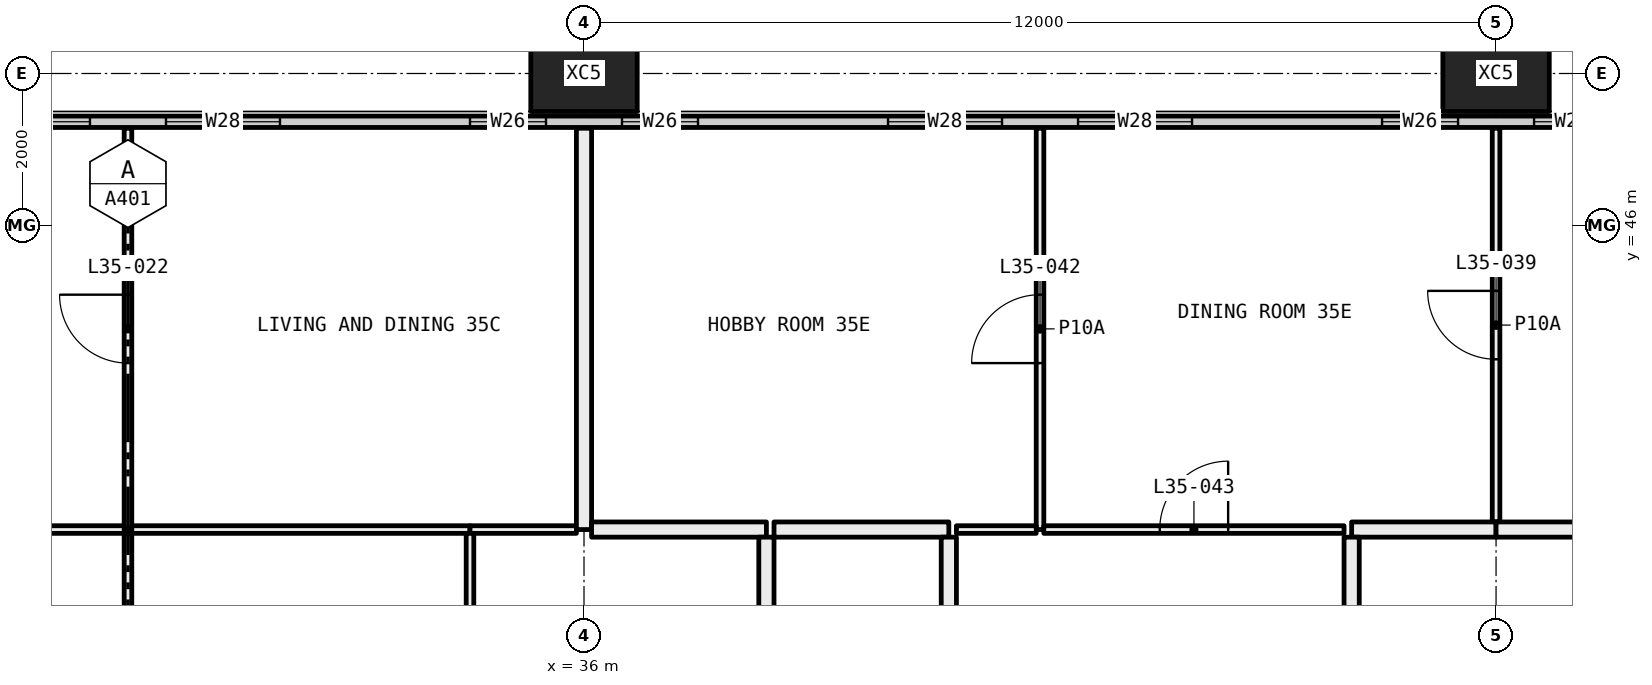
"""IFC4 building model, lengths in metres.
Left out: names, types, materials, properties, quantities, classifications, styles, units other than length and angle.
Written with IfcOpenShell. Run it as: python <this file> out.ifc"""

import sys

from ifc_helpers import new_model, si_unit, direction, frame, frame_2d, origin, origin_2d, place, context, subcontext, project, spatial, rectangle, hollow_rectangle, extrude, element, fill, save


model = new_model("IFC4")
c1 = context("Model", 3, precision=1e-05, world=origin(), true_north=direction((0.0, 1.0)))
c2 = subcontext(c1, "Body", "Model", "MODEL_VIEW")
j1 = project(units=[si_unit("LENGTHUNIT", "METRE"), si_unit("PLANEANGLEUNIT", "RADIAN")], contexts=[c1])
p1 = place(None, origin())
s1 = spatial("IfcSite", under=j1, at=p1, CompositionType="ELEMENT")
p2 = place(p1, origin())
s2 = spatial("IfcBuilding", under=s1, at=p2, CompositionType="ELEMENT")
p3 = place(p2, frame((0.0, 0.0, 134.55)))
s3 = spatial("IfcBuildingStorey", under=s2, at=p3, CompositionType="ELEMENT", Elevation=134.55)
for number, where, z_axis, x_axis in (
    (1, (36.0, 48.0, -0.4), (0.0, 0.0, 1.0), (1.0, 0.0, 0.0)),
    (2, (48.0, 48.0, -0.4), (0.0, 0.0, 1.0), (1.0, 0.0, 0.0)),
):
    element("IfcColumn", number, at=place(p3, frame(where, z_axis=z_axis, x_axis=x_axis)), inside=s3, PredefinedType="COLUMN", context=c2, shape_type="SweptSolid", body=[
        extrude(hollow_rectangle(XDim=1.4, YDim=1.0, WallThickness=0.055, at=origin_2d()), origin(), (0.0, 0.0, 1.0), 3.45),
    ])
p4 = place(p3, frame((6.56, 47.365, 0.0), z_axis=(0.0, 0.0, 1.0), x_axis=(1.0, 0.0, 0.0)))
e3 = element("IfcWall", 3, at=p4, inside=s3, PredefinedType="ELEMENTEDWALL", context=c2, shape_type="SweptSolid", body=[
    extrude(rectangle(XDim=58.88, YDim=0.15, at=frame_2d((29.44, 0.0))), origin(), (0.0, 0.0, 1.0), 3.05),
])
p5 = place(p4, frame((0.44, 0.0, 0.45)))
e4 = element("IfcOpeningElement", 4, at=p5, cuts=e3, PredefinedType="OPENING", context=c2, shape_type="SweptSolid", body=[
    extrude(rectangle(XDim=4.5, YDim=2.55, at=frame_2d((2.25, 1.275))), frame((0.0, 0.085, 0.0), z_axis=(0.0, -1.0, 0.0), x_axis=(1.0, 0.0, 0.0)), (0.0, 0.0, 1.0), 0.17),
])
p6 = place(p4, frame((5.94, 0.0, 0.45)))
e5 = element("IfcOpeningElement", 5, at=p6, cuts=e3, PredefinedType="OPENING", context=c2, shape_type="SweptSolid", body=[
    extrude(rectangle(XDim=1.0, YDim=2.55, at=frame_2d((0.5, 1.275))), frame((0.0, 0.085, 0.0), z_axis=(0.0, -1.0, 0.0), x_axis=(1.0, 0.0, 0.0)), (0.0, 0.0, 1.0), 0.17),
])
p7 = place(p4, frame((9.44, 0.0, 0.45)))
e6 = element("IfcOpeningElement", 6, at=p7, cuts=e3, PredefinedType="OPENING", context=c2, shape_type="SweptSolid", body=[
    extrude(rectangle(XDim=1.5, YDim=2.55, at=frame_2d((0.75, 1.275))), frame((0.0, 0.085, 0.0), z_axis=(0.0, -1.0, 0.0), x_axis=(1.0, 0.0, 0.0)), (0.0, 0.0, 1.0), 0.17),
])
p8 = place(p4, frame((11.94, 0.0, 0.45)))
e7 = element("IfcOpeningElement", 7, at=p8, cuts=e3, PredefinedType="OPENING", context=c2, shape_type="SweptSolid", body=[
    extrude(rectangle(XDim=1.5, YDim=2.55, at=frame_2d((0.75, 1.275))), frame((0.0, 0.085, 0.0), z_axis=(0.0, -1.0, 0.0), x_axis=(1.0, 0.0, 0.0)), (0.0, 0.0, 1.0), 0.17),
])
p9 = place(p4, frame((15.94, 0.0, 0.45)))
e8 = element("IfcOpeningElement", 8, at=p9, cuts=e3, PredefinedType="OPENING", context=c2, shape_type="SweptSolid", body=[
    extrude(rectangle(XDim=1.0, YDim=2.55, at=frame_2d((0.5, 1.275))), frame((0.0, 0.085, 0.0), z_axis=(0.0, -1.0, 0.0), x_axis=(1.0, 0.0, 0.0)), (0.0, 0.0, 1.0), 0.17),
])
p10 = place(p4, frame((17.94, 0.0, 0.45)))
e9 = element("IfcOpeningElement", 9, at=p10, cuts=e3, PredefinedType="OPENING", context=c2, shape_type="SweptSolid", body=[
    extrude(rectangle(XDim=1.0, YDim=2.55, at=frame_2d((0.5, 1.275))), frame((0.0, 0.085, 0.0), z_axis=(0.0, -1.0, 0.0), x_axis=(1.0, 0.0, 0.0)), (0.0, 0.0, 1.0), 0.17),
])
p11 = place(p4, frame((21.44, 0.0, 0.45)))
e10 = element("IfcOpeningElement", 10, at=p11, cuts=e3, PredefinedType="OPENING", context=c2, shape_type="SweptSolid", body=[
    extrude(rectangle(XDim=1.5, YDim=2.55, at=frame_2d((0.75, 1.275))), frame((0.0, 0.085, 0.0), z_axis=(0.0, -1.0, 0.0), x_axis=(1.0, 0.0, 0.0)), (0.0, 0.0, 1.0), 0.17),
])
p12 = place(p4, frame((23.94, 0.0, 0.45)))
e11 = element("IfcOpeningElement", 11, at=p12, cuts=e3, PredefinedType="OPENING", context=c2, shape_type="SweptSolid", body=[
    extrude(rectangle(XDim=1.5, YDim=2.55, at=frame_2d((0.75, 1.275))), frame((0.0, 0.085, 0.0), z_axis=(0.0, -1.0, 0.0), x_axis=(1.0, 0.0, 0.0)), (0.0, 0.0, 1.0), 0.17),
])
p13 = place(p4, frame((27.94, 0.0, 0.45)))
e12 = element("IfcOpeningElement", 12, at=p13, cuts=e3, PredefinedType="OPENING", context=c2, shape_type="SweptSolid", body=[
    extrude(rectangle(XDim=1.0, YDim=2.55, at=frame_2d((0.5, 1.275))), frame((0.0, 0.085, 0.0), z_axis=(0.0, -1.0, 0.0), x_axis=(1.0, 0.0, 0.0)), (0.0, 0.0, 1.0), 0.17),
])
p14 = place(p4, frame((29.94, 0.0, 0.45)))
e13 = element("IfcOpeningElement", 13, at=p14, cuts=e3, PredefinedType="OPENING", context=c2, shape_type="SweptSolid", body=[
    extrude(rectangle(XDim=1.0, YDim=2.55, at=frame_2d((0.5, 1.275))), frame((0.0, 0.085, 0.0), z_axis=(0.0, -1.0, 0.0), x_axis=(1.0, 0.0, 0.0)), (0.0, 0.0, 1.0), 0.17),
])
p15 = place(p4, frame((33.44, 0.0, 0.45)))
e14 = element("IfcOpeningElement", 14, at=p15, cuts=e3, PredefinedType="OPENING", context=c2, shape_type="SweptSolid", body=[
    extrude(rectangle(XDim=1.5, YDim=2.55, at=frame_2d((0.75, 1.275))), frame((0.0, 0.085, 0.0), z_axis=(0.0, -1.0, 0.0), x_axis=(1.0, 0.0, 0.0)), (0.0, 0.0, 1.0), 0.17),
])
p16 = place(p4, frame((35.94, 0.0, 0.45)))
e15 = element("IfcOpeningElement", 15, at=p16, cuts=e3, PredefinedType="OPENING", context=c2, shape_type="SweptSolid", body=[
    extrude(rectangle(XDim=1.5, YDim=2.55, at=frame_2d((0.75, 1.275))), frame((0.0, 0.085, 0.0), z_axis=(0.0, -1.0, 0.0), x_axis=(1.0, 0.0, 0.0)), (0.0, 0.0, 1.0), 0.17),
])
p17 = place(p4, frame((39.94, 0.0, 0.45)))
e16 = element("IfcOpeningElement", 16, at=p17, cuts=e3, PredefinedType="OPENING", context=c2, shape_type="SweptSolid", body=[
    extrude(rectangle(XDim=1.0, YDim=2.55, at=frame_2d((0.5, 1.275))), frame((0.0, 0.085, 0.0), z_axis=(0.0, -1.0, 0.0), x_axis=(1.0, 0.0, 0.0)), (0.0, 0.0, 1.0), 0.17),
])
p18 = place(p4, frame((41.94, 0.0, 0.45)))
e17 = element("IfcOpeningElement", 17, at=p18, cuts=e3, PredefinedType="OPENING", context=c2, shape_type="SweptSolid", body=[
    extrude(rectangle(XDim=1.0, YDim=2.55, at=frame_2d((0.5, 1.275))), frame((0.0, 0.085, 0.0), z_axis=(0.0, -1.0, 0.0), x_axis=(1.0, 0.0, 0.0)), (0.0, 0.0, 1.0), 0.17),
])
p19 = place(p4, frame((45.44, 0.0, 0.45)))
e18 = element("IfcOpeningElement", 18, at=p19, cuts=e3, PredefinedType="OPENING", context=c2, shape_type="SweptSolid", body=[
    extrude(rectangle(XDim=1.5, YDim=2.55, at=frame_2d((0.75, 1.275))), frame((0.0, 0.085, 0.0), z_axis=(0.0, -1.0, 0.0), x_axis=(1.0, 0.0, 0.0)), (0.0, 0.0, 1.0), 0.17),
])
p20 = place(p4, frame((47.94, 0.0, 0.45)))
e19 = element("IfcOpeningElement", 19, at=p20, cuts=e3, PredefinedType="OPENING", context=c2, shape_type="SweptSolid", body=[
    extrude(rectangle(XDim=1.5, YDim=2.55, at=frame_2d((0.75, 1.275))), frame((0.0, 0.085, 0.0), z_axis=(0.0, -1.0, 0.0), x_axis=(1.0, 0.0, 0.0)), (0.0, 0.0, 1.0), 0.17),
])
p21 = place(p4, frame((51.94, 0.0, 0.45)))
e20 = element("IfcOpeningElement", 20, at=p21, cuts=e3, PredefinedType="OPENING", context=c2, shape_type="SweptSolid", body=[
    extrude(rectangle(XDim=1.0, YDim=2.55, at=frame_2d((0.5, 1.275))), frame((0.0, 0.085, 0.0), z_axis=(0.0, -1.0, 0.0), x_axis=(1.0, 0.0, 0.0)), (0.0, 0.0, 1.0), 0.17),
])
p22 = place(p4, frame((53.94, 0.0, 0.45)))
e21 = element("IfcOpeningElement", 21, at=p22, cuts=e3, PredefinedType="OPENING", context=c2, shape_type="SweptSolid", body=[
    extrude(rectangle(XDim=4.5, YDim=2.55, at=frame_2d((2.25, 1.275))), frame((0.0, 0.085, 0.0), z_axis=(0.0, -1.0, 0.0), x_axis=(1.0, 0.0, 0.0)), (0.0, 0.0, 1.0), 0.17),
])
p23 = place(p3, frame((30.0, 42.0, 0.0), z_axis=(0.0, 0.0, 1.0), x_axis=(0.0, 1.0, 0.0)))
e22 = element("IfcWall", 22, at=p23, inside=s3, PredefinedType="PARTITIONING", context=c2, shape_type="SweptSolid", body=[
    extrude(rectangle(XDim=5.28, YDim=0.1, at=frame_2d((2.64, 0.0))), origin(), (0.0, 0.0, 1.0), 3.05),
])
p24 = place(p23, frame((2.19, 0.0, 0.0)))
e23 = element("IfcOpeningElement", 23, at=p24, cuts=e22, PredefinedType="OPENING", context=c2, shape_type="SweptSolid", body=[
    extrude(rectangle(XDim=0.9, YDim=2.1, at=frame_2d((0.45, 1.05))), frame((0.0, 0.06, 0.0), z_axis=(0.0, -1.0, 0.0), x_axis=(1.0, 0.0, 0.0)), (0.0, 0.0, 1.0), 0.12),
])
p25 = place(p3, frame((26.0, 42.0, 0.0), z_axis=(0.0, 0.0, 1.0), x_axis=(1.0, 0.0, 0.0)))
e24 = element("IfcWall", 24, at=p25, inside=s3, PredefinedType="PARTITIONING", context=c2, shape_type="SweptSolid", body=[
    extrude(rectangle(XDim=3.95, YDim=0.1, at=frame_2d((1.975, 0.0))), origin(), (0.0, 0.0, 1.0), 3.05),
])
p26 = place(p25, frame((1.525, 0.0, 0.0)))
e25 = element("IfcOpeningElement", 25, at=p26, cuts=e24, PredefinedType="OPENING", context=c2, shape_type="SweptSolid", body=[
    extrude(rectangle(XDim=0.9, YDim=2.1, at=frame_2d((0.45, 1.05))), frame((0.0, 0.06, 0.0), z_axis=(0.0, -1.0, 0.0), x_axis=(1.0, 0.0, 0.0)), (0.0, 0.0, 1.0), 0.12),
])
p27 = place(p3, frame((30.05, 42.0, 0.0), z_axis=(0.0, 0.0, 1.0), x_axis=(1.0, 0.0, 0.0)))
e26 = element("IfcWall", 26, at=p27, inside=s3, PredefinedType="PARTITIONING", context=c2, shape_type="SweptSolid", body=[
    extrude(rectangle(XDim=4.45, YDim=0.1, at=frame_2d((2.225, 0.0))), origin(), (0.0, 0.0, 1.0), 3.05),
])
p28 = place(p3, frame((34.5, 42.0, 0.0), z_axis=(0.0, 0.0, 1.0), x_axis=(1.0, 0.0, 0.0)))
e27 = element("IfcWall", 27, at=p28, inside=s3, PredefinedType="PARTITIONING", context=c2, shape_type="SweptSolid", body=[
    extrude(rectangle(XDim=1.4, YDim=0.1, at=frame_2d((0.7, 0.0))), origin(), (0.0, 0.0, 1.0), 3.05),
])
p29 = place(p3, frame((36.0, 42.0, 0.0), z_axis=(0.0, 0.0, 1.0), x_axis=(0.0, 1.0, 0.0)))
e28 = element("IfcWall", 28, at=p29, inside=s3, PredefinedType="PARTITIONING", context=c2, shape_type="SweptSolid", body=[
    extrude(rectangle(XDim=5.28, YDim=0.2, at=frame_2d((2.64, 0.0))), origin(), (0.0, 0.0, 1.0), 2.45),
])
p30 = place(p3, frame((30.0, 36.1, 0.0), z_axis=(0.0, 0.0, 1.0), x_axis=(0.0, 1.0, 0.0)))
e29 = element("IfcWall", 29, at=p30, inside=s3, PredefinedType="PARTITIONING", context=c2, shape_type="SweptSolid", body=[
    extrude(rectangle(XDim=5.85, YDim=0.1, at=frame_2d((2.925, 0.0))), origin(), (0.0, 0.0, 1.0), 3.05),
])
p31 = place(p30, frame((2.475, 0.0, 0.0)))
e30 = element("IfcOpeningElement", 30, at=p31, cuts=e29, PredefinedType="OPENING", context=c2, shape_type="SweptSolid", body=[
    extrude(rectangle(XDim=0.9, YDim=2.1, at=frame_2d((0.45, 1.05))), frame((0.0, 0.06, 0.0), z_axis=(0.0, -1.0, 0.0), x_axis=(1.0, 0.0, 0.0)), (0.0, 0.0, 1.0), 0.12),
])
p32 = place(p3, frame((34.5, 36.1, 0.0), z_axis=(0.0, 0.0, 1.0), x_axis=(0.0, 1.0, 0.0)))
e31 = element("IfcWall", 31, at=p32, inside=s3, PredefinedType="PARTITIONING", context=c2, shape_type="SweptSolid", body=[
    extrude(rectangle(XDim=5.85, YDim=0.1, at=frame_2d((2.925, 0.0))), origin(), (0.0, 0.0, 1.0), 3.05),
])
p33 = place(p32, frame((2.475, 0.0, 0.0)))
e32 = element("IfcOpeningElement", 32, at=p33, cuts=e31, PredefinedType="OPENING", context=c2, shape_type="SweptSolid", body=[
    extrude(rectangle(XDim=0.9, YDim=2.1, at=frame_2d((0.45, 1.05))), frame((0.0, 0.06, 0.0), z_axis=(0.0, -1.0, 0.0), x_axis=(1.0, 0.0, 0.0)), (0.0, 0.0, 1.0), 0.12),
])
p34 = place(p3, frame((38.4, 42.0, 0.0), z_axis=(0.0, 0.0, 1.0), x_axis=(-1.0, 0.0, 0.0)))
e33 = element("IfcWall", 33, at=p34, inside=s3, PredefinedType="PARTITIONING", context=c2, shape_type="SweptSolid", body=[
    extrude(rectangle(XDim=2.3, YDim=0.2, at=frame_2d((1.15, 0.0))), origin(), (0.0, 0.0, 1.0), 3.05),
])
p35 = place(p3, frame((38.4, 36.1, 0.0), z_axis=(0.0, 0.0, 1.0), x_axis=(0.0, 1.0, 0.0)))
e34 = element("IfcWall", 34, at=p35, inside=s3, PredefinedType="PARTITIONING", context=c2, shape_type="SweptSolid", body=[
    extrude(rectangle(XDim=5.8, YDim=0.2, at=frame_2d((2.9, 0.0))), origin(), (0.0, 0.0, 1.0), 3.05),
])
p36 = place(p3, frame((42.0, 42.0, 0.0), z_axis=(0.0, 0.0, 1.0), x_axis=(0.0, 1.0, 0.0)))
e35 = element("IfcWall", 35, at=p36, inside=s3, PredefinedType="PARTITIONING", context=c2, shape_type="SweptSolid", body=[
    extrude(rectangle(XDim=5.28, YDim=0.1, at=frame_2d((2.64, 0.0))), origin(), (0.0, 0.0, 1.0), 3.05),
])
p37 = place(p36, frame((2.19, 0.0, 0.0)))
e36 = element("IfcOpeningElement", 36, at=p37, cuts=e35, PredefinedType="OPENING", context=c2, shape_type="SweptSolid", body=[
    extrude(rectangle(XDim=0.9, YDim=2.1, at=frame_2d((0.45, 1.05))), frame((0.0, 0.06, 0.0), z_axis=(0.0, -1.0, 0.0), x_axis=(1.0, 0.0, 0.0)), (0.0, 0.0, 1.0), 0.12),
])
p38 = place(p3, frame((40.9, 42.0, 0.0), z_axis=(0.0, 0.0, 1.0), x_axis=(1.0, 0.0, 0.0)))
e37 = element("IfcWall", 37, at=p38, inside=s3, PredefinedType="PARTITIONING", context=c2, shape_type="SweptSolid", body=[
    extrude(rectangle(XDim=1.05, YDim=0.1, at=frame_2d((0.525, 0.0))), origin(), (0.0, 0.0, 1.0), 3.05),
])
p39 = place(p3, frame((38.5, 42.0, 0.0), z_axis=(0.0, 0.0, 1.0), x_axis=(1.0, 0.0, 0.0)))
e38 = element("IfcWall", 38, at=p39, inside=s3, PredefinedType="PARTITIONING", context=c2, shape_type="SweptSolid", body=[
    extrude(rectangle(XDim=2.3, YDim=0.2, at=frame_2d((1.15, 0.0))), origin(), (0.0, 0.0, 1.0), 3.05),
])
p40 = place(p3, frame((48.0, 42.1, 0.0), z_axis=(0.0, 0.0, 1.0), x_axis=(0.0, 1.0, 0.0)))
e39 = element("IfcWall", 39, at=p40, inside=s3, PredefinedType="PARTITIONING", context=c2, shape_type="SweptSolid", body=[
    extrude(rectangle(XDim=5.18, YDim=0.1, at=frame_2d((2.59, 0.0))), origin(), (0.0, 0.0, 1.0), 3.05),
])
p41 = place(p40, frame((2.14, 0.0, 0.0)))
e40 = element("IfcOpeningElement", 40, at=p41, cuts=e39, PredefinedType="OPENING", context=c2, shape_type="SweptSolid", body=[
    extrude(rectangle(XDim=0.9, YDim=2.1, at=frame_2d((0.45, 1.05))), frame((0.0, 0.06, 0.0), z_axis=(0.0, -1.0, 0.0), x_axis=(1.0, 0.0, 0.0)), (0.0, 0.0, 1.0), 0.12),
])
p42 = place(p3, frame((42.05, 42.0, 0.0), z_axis=(0.0, 0.0, 1.0), x_axis=(1.0, 0.0, 0.0)))
e41 = element("IfcWall", 41, at=p42, inside=s3, PredefinedType="PARTITIONING", context=c2, shape_type="SweptSolid", body=[
    extrude(rectangle(XDim=3.95, YDim=0.1, at=frame_2d((1.975, 0.0))), origin(), (0.0, 0.0, 1.0), 3.05),
])
p43 = place(p42, frame((1.525, 0.0, 0.0)))
e42 = element("IfcOpeningElement", 42, at=p43, cuts=e41, PredefinedType="OPENING", context=c2, shape_type="SweptSolid", body=[
    extrude(rectangle(XDim=0.9, YDim=2.1, at=frame_2d((0.45, 1.05))), frame((0.0, 0.06, 0.0), z_axis=(0.0, -1.0, 0.0), x_axis=(1.0, 0.0, 0.0)), (0.0, 0.0, 1.0), 0.12),
])
p44 = place(p3, frame((46.1, 42.0, 0.0), z_axis=(0.0, 0.0, 1.0), x_axis=(1.0, 0.0, 0.0)))
e43 = element("IfcWall", 43, at=p44, inside=s3, PredefinedType="PARTITIONING", context=c2, shape_type="SweptSolid", body=[
    extrude(rectangle(XDim=1.9, YDim=0.2, at=frame_2d((0.95, 0.0))), origin(), (0.0, 0.0, 1.0), 3.05),
])
p45 = place(p3, frame((48.0, 42.0, 0.0), z_axis=(0.0, 0.0, 1.0), x_axis=(1.0, 0.0, 0.0)))
e44 = element("IfcWall", 44, at=p45, inside=s3, PredefinedType="PARTITIONING", context=c2, shape_type="SweptSolid", body=[
    extrude(rectangle(XDim=6.0, YDim=0.2, at=frame_2d((3.0, 0.0))), origin(), (0.0, 0.0, 1.0), 3.05),
])
p46 = place(p45, frame((2.5, 0.0, 0.0)))
e45 = element("IfcOpeningElement", 45, at=p46, cuts=e44, PredefinedType="OPENING", context=c2, shape_type="SweptSolid", body=[
    extrude(rectangle(XDim=1.0, YDim=2.1, at=frame_2d((0.5, 1.05))), frame((0.0, 0.11, 0.0), z_axis=(0.0, -1.0, 0.0), x_axis=(1.0, 0.0, 0.0)), (0.0, 0.0, 1.0), 0.22),
])
p47 = place(p3, frame((40.8, 41.9, 0.0), z_axis=(0.0, 0.0, 1.0), x_axis=(0.0, -1.0, 0.0)))
e46 = element("IfcWall", 46, at=p47, inside=s3, PredefinedType="PARTITIONING", context=c2, shape_type="SweptSolid", body=[
    extrude(rectangle(XDim=6.2, YDim=0.2, at=frame_2d((3.1, 0.0))), origin(), (0.0, 0.0, 1.0), 2.45),
])
p48 = place(p3, frame((46.1, 36.1, 0.0), z_axis=(0.0, 0.0, 1.0), x_axis=(0.0, 1.0, 0.0)))
e47 = element("IfcWall", 47, at=p48, inside=s3, PredefinedType="PARTITIONING", context=c2, shape_type="SweptSolid", body=[
    extrude(rectangle(XDim=5.8, YDim=0.2, at=frame_2d((2.9, 0.0))), origin(), (0.0, 0.0, 1.0), 3.05),
])
p49 = place(p11, origin())
e48 = element("IfcWindow", 48, at=p49, inside=s3, PartitioningType="SINGLE_PANEL", PredefinedType="WINDOW", context=c2, shape_type="SweptSolid", body=[
    extrude(rectangle(XDim=1.5, YDim=2.55, at=frame_2d((0.75, 1.275))), frame((0.0, 0.03, 0.0), z_axis=(0.0, -1.0, 0.0), x_axis=(1.0, 0.0, 0.0)), (0.0, 0.0, 1.0), 0.06),
])
fill(e10, e48)
p50 = place(p12, origin())
e49 = element("IfcWindow", 49, at=p50, inside=s3, PartitioningType="SINGLE_PANEL", PredefinedType="WINDOW", context=c2, shape_type="SweptSolid", body=[
    extrude(rectangle(XDim=1.5, YDim=2.55, at=frame_2d((0.75, 1.275))), frame((0.0, 0.03, 0.0), z_axis=(0.0, -1.0, 0.0), x_axis=(1.0, 0.0, 0.0)), (0.0, 0.0, 1.0), 0.06),
])
fill(e11, e49)
p51 = place(p13, origin())
e50 = element("IfcWindow", 50, at=p51, inside=s3, PartitioningType="SINGLE_PANEL", PredefinedType="WINDOW", context=c2, shape_type="SweptSolid", body=[
    extrude(rectangle(XDim=1.0, YDim=2.55, at=frame_2d((0.5, 1.275))), frame((0.0, 0.03, 0.0), z_axis=(0.0, -1.0, 0.0), x_axis=(1.0, 0.0, 0.0)), (0.0, 0.0, 1.0), 0.06),
])
fill(e12, e50)
p52 = place(p14, origin())
e51 = element("IfcWindow", 51, at=p52, inside=s3, PartitioningType="SINGLE_PANEL", PredefinedType="WINDOW", context=c2, shape_type="SweptSolid", body=[
    extrude(rectangle(XDim=1.0, YDim=2.55, at=frame_2d((0.5, 1.275))), frame((0.0, 0.03, 0.0), z_axis=(0.0, -1.0, 0.0), x_axis=(1.0, 0.0, 0.0)), (0.0, 0.0, 1.0), 0.06),
])
fill(e13, e51)
p53 = place(p15, origin())
e52 = element("IfcWindow", 52, at=p53, inside=s3, PartitioningType="SINGLE_PANEL", PredefinedType="WINDOW", context=c2, shape_type="SweptSolid", body=[
    extrude(rectangle(XDim=1.5, YDim=2.55, at=frame_2d((0.75, 1.275))), frame((0.0, 0.03, 0.0), z_axis=(0.0, -1.0, 0.0), x_axis=(1.0, 0.0, 0.0)), (0.0, 0.0, 1.0), 0.06),
])
fill(e14, e52)
p54 = place(p16, origin())
e53 = element("IfcWindow", 53, at=p54, inside=s3, PartitioningType="SINGLE_PANEL", PredefinedType="WINDOW", context=c2, shape_type="SweptSolid", body=[
    extrude(rectangle(XDim=1.5, YDim=2.55, at=frame_2d((0.75, 1.275))), frame((0.0, 0.03, 0.0), z_axis=(0.0, -1.0, 0.0), x_axis=(1.0, 0.0, 0.0)), (0.0, 0.0, 1.0), 0.06),
])
fill(e15, e53)
p55 = place(p17, origin())
e54 = element("IfcWindow", 54, at=p55, inside=s3, PartitioningType="SINGLE_PANEL", PredefinedType="WINDOW", context=c2, shape_type="SweptSolid", body=[
    extrude(rectangle(XDim=1.0, YDim=2.55, at=frame_2d((0.5, 1.275))), frame((0.0, 0.03, 0.0), z_axis=(0.0, -1.0, 0.0), x_axis=(1.0, 0.0, 0.0)), (0.0, 0.0, 1.0), 0.06),
])
fill(e16, e54)
p56 = place(p18, origin())
e55 = element("IfcWindow", 55, at=p56, inside=s3, PartitioningType="SINGLE_PANEL", PredefinedType="WINDOW", context=c2, shape_type="SweptSolid", body=[
    extrude(rectangle(XDim=1.0, YDim=2.55, at=frame_2d((0.5, 1.275))), frame((0.0, 0.03, 0.0), z_axis=(0.0, -1.0, 0.0), x_axis=(1.0, 0.0, 0.0)), (0.0, 0.0, 1.0), 0.06),
])
fill(e17, e55)
p57 = place(p24, origin())
e56 = element("IfcDoor", 56, at=p57, inside=s3, OperationType="SINGLE_SWING_LEFT", PredefinedType="DOOR", context=c2, shape_type="SweptSolid", body=[
    extrude(rectangle(XDim=0.9, YDim=2.1, at=frame_2d((0.45, 1.05))), frame((0.0, 0.025, 0.0), z_axis=(0.0, -1.0, 0.0), x_axis=(1.0, 0.0, 0.0)), (0.0, 0.0, 1.0), 0.05),
])
fill(e23, e56)
p58 = place(p41, origin())
e57 = element("IfcDoor", 57, at=p58, inside=s3, OperationType="SINGLE_SWING_LEFT", PredefinedType="DOOR", context=c2, shape_type="SweptSolid", body=[
    extrude(rectangle(XDim=0.9, YDim=2.1, at=frame_2d((0.45, 1.05))), frame((0.0, 0.025, 0.0), z_axis=(0.0, -1.0, 0.0), x_axis=(1.0, 0.0, 0.0)), (0.0, 0.0, 1.0), 0.05),
])
fill(e40, e57)
p59 = place(p37, origin())
e58 = element("IfcDoor", 58, at=p59, inside=s3, OperationType="SINGLE_SWING_RIGHT", PredefinedType="DOOR", context=c2, shape_type="SweptSolid", body=[
    extrude(rectangle(XDim=0.9, YDim=2.1, at=frame_2d((0.45, 1.05))), frame((0.0, 0.025, 0.0), z_axis=(0.0, -1.0, 0.0), x_axis=(1.0, 0.0, 0.0)), (0.0, 0.0, 1.0), 0.05),
])
fill(e36, e58)
p60 = place(p43, origin())
e59 = element("IfcDoor", 59, at=p60, inside=s3, OperationType="SINGLE_SWING_LEFT", PredefinedType="DOOR", context=c2, shape_type="SweptSolid", body=[
    extrude(rectangle(XDim=0.9, YDim=2.1, at=frame_2d((0.45, 1.05))), frame((0.0, 0.025, 0.0), z_axis=(0.0, -1.0, 0.0), x_axis=(1.0, 0.0, 0.0)), (0.0, 0.0, 1.0), 0.05),
])
fill(e42, e59)
save(model, sys.argv[1])
